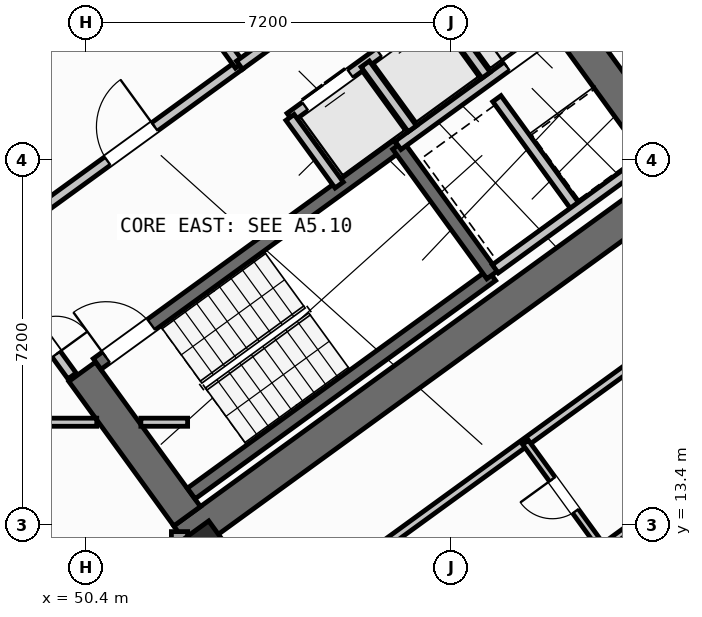
"""IFC4 building model, lengths in metres.
Left out: names, types, materials, properties, quantities, classifications, styles, units other than length and angle.
Written with IfcOpenShell. Run it as: python <this file> out.ifc"""

import sys

from ifc_helpers import new_model, si_unit, direction, frame, frame_2d, origin, origin_2d, place, context, subcontext, project, spatial, rectangle, hollow_rectangle, extrude, source, transform, mapped, element, fill, save


model = new_model("IFC4")
c1 = context("Model", 3, precision=1e-05, world=origin(), true_north=direction((0.0, 1.0)))
c2 = subcontext(c1, "Body", "Model", "MODEL_VIEW")
j1 = project(units=[si_unit("LENGTHUNIT", "METRE"), si_unit("PLANEANGLEUNIT", "RADIAN")], contexts=[c1])
p1 = place(None, origin())
s1 = spatial("IfcSite", under=j1, at=p1, CompositionType="ELEMENT")
p2 = place(p1, origin())
s2 = spatial("IfcBuilding", under=s1, at=p2, CompositionType="ELEMENT")
p3 = place(p2, frame((0.0, 0.0, 31.2)))
s3 = spatial("IfcBuildingStorey", under=s2, at=p3, CompositionType="ELEMENT", Elevation=31.2)
p4 = place(p3, frame((52.318, 13.11, 0.0), z_axis=(0.0, 0.0, 1.0), x_axis=(0.809019445368, 0.587781878776, 0.0)))
e1 = element("IfcWall", 1, at=p4, inside=s3, PredefinedType="SHEAR", context=c2, shape_type="SweptSolid", body=[
    extrude(rectangle(XDim=12.44, YDim=0.65, at=frame_2d((6.22, 0.0))), origin(), (0.0, 0.0, 1.0), 3.35),
])
p5 = place(p3, frame((52.39, 13.564, 0.0), z_axis=(0.0, 0.0, 1.0), x_axis=(-0.58779688989, 0.809008539037, 0.0)))
e2 = element("IfcWall", 2, at=p5, inside=s3, PredefinedType="SHEAR", context=c2, shape_type="SweptSolid", body=[
    extrude(rectangle(XDim=3.525, YDim=0.65, at=frame_2d((1.763, 0.0))), origin(), (0.0, 0.0, 1.0), 3.35),
])
p6 = place(p3, frame((61.929, 20.494, 0.0), z_axis=(0.0, 0.0, 1.0), x_axis=(-0.58782982593, 0.808984607855, 0.0)))
e3 = element("IfcWall", 3, at=p6, inside=s3, PredefinedType="SHEAR", context=c2, shape_type="SweptSolid", body=[
    extrude(rectangle(XDim=3.525, YDim=0.65, at=frame_2d((1.762, 0.0))), origin(), (0.0, 0.0, 1.0), 3.35),
])
m1 = source(origin(), c2, "Body", "SweptSolid", [
    extrude(hollow_rectangle(XDim=1.0, YDim=1.0, WallThickness=0.04, at=origin_2d()), origin(), (0.0, 0.0, 1.0), 3.6),
])
p7 = place(p3, frame((52.705, 12.773, 0.0), z_axis=(0.0, 0.0, 1.0), x_axis=(0.809016994375, 0.587785252292, 0.0)))
e4 = element("IfcColumn", 4, at=p7, inside=s3, PredefinedType="COLUMN", context=c2, shape_type="MappedRepresentation", body=[
    mapped(m1, transform((0.0, 0.0, 0.0), scale=1.0)),
])
p8 = place(p3, frame((58.455, 35.484, 0.0), z_axis=(0.0, 0.0, 1.0), x_axis=(0.587783625747, -0.809018176127, 0.0)))
e5 = element("IfcWall", 5, at=p8, inside=s3, PredefinedType="STANDARD", context=c2, shape_type="SweptSolid", body=[
    extrude(rectangle(XDim=21.587, YDim=0.32, at=frame_2d((10.794, 0.0))), origin(), (0.0, 0.0, 1.0), 2.725),
])
p9 = place(p8, frame((2.994, 0.0, 0.8)))
e6 = element("IfcOpeningElement", 6, at=p9, cuts=e5, PredefinedType="OPENING", context=c2, shape_type="SweptSolid", body=[
    extrude(rectangle(XDim=2.1, YDim=1.55, at=frame_2d((1.05, 0.775))), frame((0.0, 0.17, 0.0), z_axis=(0.0, -1.0, 0.0), x_axis=(1.0, 0.0, 0.0)), (0.0, 0.0, 1.0), 0.34),
])
p10 = place(p8, frame((11.934, 0.0, 0.85)))
e7 = element("IfcOpeningElement", 7, at=p10, cuts=e5, PredefinedType="OPENING", context=c2, shape_type="SweptSolid", body=[
    extrude(rectangle(XDim=1.8, YDim=1.5, at=frame_2d((0.9, 0.75))), frame((0.0, 0.17, 0.0), z_axis=(0.0, -1.0, 0.0), x_axis=(1.0, 0.0, 0.0)), (0.0, 0.0, 1.0), 0.34),
])
p11 = place(p8, frame((18.535, 0.0, 0.85)))
e8 = element("IfcOpeningElement", 8, at=p11, cuts=e5, PredefinedType="OPENING", context=c2, shape_type="SweptSolid", body=[
    extrude(rectangle(XDim=1.5, YDim=1.5, at=frame_2d((0.75, 0.75))), frame((0.0, 0.17, 0.0), z_axis=(0.0, -1.0, 0.0), x_axis=(1.0, 0.0, 0.0)), (0.0, 0.0, 1.0), 0.34),
])
p12 = place(p3, frame((71.098, 17.731, 0.0), z_axis=(0.0, 0.0, 1.0), x_axis=(-0.809021120468, -0.587779573171, 0.0)))
e9 = element("IfcWall", 9, at=p12, inside=s3, PredefinedType="STANDARD", context=c2, shape_type="SweptSolid", body=[
    extrude(rectangle(XDim=17.588, YDim=0.32, at=frame_2d((8.794, 0.0))), origin(), (0.0, 0.0, 1.0), 3.35),
])
p13 = place(p12, frame((1.624, 0.0, 0.0)))
e10 = element("IfcOpeningElement", 10, at=p13, cuts=e9, PredefinedType="OPENING", context=c2, shape_type="SweptSolid", body=[
    extrude(rectangle(XDim=1.05, YDim=2.15, at=frame_2d((0.525, 1.075))), frame((0.0, 0.17, 0.0), z_axis=(0.0, -1.0, 0.0), x_axis=(1.0, 0.0, 0.0)), (0.0, 0.0, 1.0), 0.34),
])
p14 = place(p12, frame((4.104, 0.0, 1.0)))
e11 = element("IfcOpeningElement", 11, at=p14, cuts=e9, PredefinedType="OPENING", context=c2, shape_type="SweptSolid", body=[
    extrude(rectangle(XDim=0.9, YDim=1.25, at=frame_2d((0.45, 0.625))), frame((0.0, 0.17, 0.0), z_axis=(0.0, -1.0, 0.0), x_axis=(1.0, 0.0, 0.0)), (0.0, 0.0, 1.0), 0.34),
])
p15 = place(p12, frame((7.879, 0.0, 0.85)))
e12 = element("IfcOpeningElement", 12, at=p15, cuts=e9, PredefinedType="OPENING", context=c2, shape_type="SweptSolid", body=[
    extrude(rectangle(XDim=1.8, YDim=1.5, at=frame_2d((0.9, 0.75))), frame((0.0, 0.17, 0.0), z_axis=(0.0, -1.0, 0.0), x_axis=(1.0, 0.0, 0.0)), (0.0, 0.0, 1.0), 0.34),
])
p16 = place(p12, frame((12.849, 0.0, 0.85)))
e13 = element("IfcOpeningElement", 13, at=p16, cuts=e9, PredefinedType="OPENING", context=c2, shape_type="SweptSolid", body=[
    extrude(rectangle(XDim=1.8, YDim=1.5, at=frame_2d((0.9, 0.75))), frame((0.0, 0.17, 0.0), z_axis=(0.0, -1.0, 0.0), x_axis=(1.0, 0.0, 0.0)), (0.0, 0.0, 1.0), 0.34),
])
p17 = place(p3, frame((52.24, 13.261, 0.0), z_axis=(0.0, 0.0, 1.0), x_axis=(0.0, -1.0, 0.0)))
e14 = element("IfcWall", 14, at=p17, inside=s3, PredefinedType="STANDARD", context=c2, shape_type="SweptSolid", body=[
    extrude(rectangle(XDim=9.795, YDim=0.32, at=frame_2d((4.897, 0.0))), origin(), (0.0, 0.0, 1.0), 3.35),
])
p18 = place(p17, frame((2.349, 0.0, 0.8)))
e15 = element("IfcOpeningElement", 15, at=p18, cuts=e14, PredefinedType="OPENING", context=c2, shape_type="SweptSolid", body=[
    extrude(rectangle(XDim=2.1, YDim=1.55, at=frame_2d((1.05, 0.775))), frame((0.0, 0.17, 0.0), z_axis=(0.0, -1.0, 0.0), x_axis=(1.0, 0.0, 0.0)), (0.0, 0.0, 1.0), 0.34),
])
p19 = place(p17, frame((7.03, 0.0, 0.85)))
e16 = element("IfcOpeningElement", 16, at=p19, cuts=e14, PredefinedType="OPENING", context=c2, shape_type="SweptSolid", body=[
    extrude(rectangle(XDim=1.8, YDim=1.5, at=frame_2d((0.9, 0.75))), frame((0.0, 0.17, 0.0), z_axis=(0.0, -1.0, 0.0), x_axis=(1.0, 0.0, 0.0)), (0.0, 0.0, 1.0), 0.34),
])
p20 = place(p3, frame((52.472, 14.013, 0.0), z_axis=(0.0, 0.0, 1.0), x_axis=(0.809028366311, 0.587769599847, 0.0)))
e17 = element("IfcWall", 17, at=p20, inside=s3, PredefinedType="SHEAR", context=c2, shape_type="SweptSolid", body=[
    extrude(rectangle(XDim=7.33, YDim=0.26, at=frame_2d((3.665, 0.0))), origin(), (0.0, 0.0, 1.0), 3.35),
])
p21 = place(p3, frame((50.615, 16.57, 0.0), z_axis=(0.0, 0.0, 1.0), x_axis=(0.809028366311, 0.587769599847, 0.0)))
e18 = element("IfcWall", 18, at=p21, inside=s3, PredefinedType="SHEAR", context=c2, shape_type="SweptSolid", body=[
    extrude(rectangle(XDim=7.33, YDim=0.26, at=frame_2d((3.665, 0.0))), origin(), (0.0, 0.0, 1.0), 3.35),
])
p22 = place(p21, frame((0.22, 0.0, 0.0)))
e19 = element("IfcOpeningElement", 19, at=p22, cuts=e18, PredefinedType="OPENING", context=c2, shape_type="SweptSolid", body=[
    extrude(rectangle(XDim=1.1, YDim=2.1, at=frame_2d((0.55, 1.05))), frame((0.0, 0.14, 0.0), z_axis=(0.0, -1.0, 0.0), x_axis=(1.0, 0.0, 0.0)), (0.0, 0.0, 1.0), 0.28),
])
p23 = place(p3, frame((58.41, 18.327, 0.0), z_axis=(0.0, 0.0, 1.0), x_axis=(-0.58776738483, 0.809029975545, 0.0)))
e20 = element("IfcWall", 20, at=p23, inside=s3, PredefinedType="SHEAR", context=c2, shape_type="SweptSolid", body=[
    extrude(rectangle(XDim=3.16, YDim=0.26, at=frame_2d((1.58, 0.0))), origin(), (0.0, 0.0, 1.0), 3.35),
])
p24 = place(p3, frame((47.106, 21.437, 0.0), z_axis=(0.0, 0.0, 1.0), x_axis=(0.809012514015, 0.58779141893, 0.0)))
e21 = element("IfcWall", 21, at=p24, inside=s3, PredefinedType="STANDARD", context=c2, shape_type="SweptSolid", body=[
    extrude(rectangle(XDim=3.398, YDim=0.2, at=frame_2d((1.699, 0.0))), origin(), (0.0, 0.0, 1.0), 3.34),
])
p25 = place(p24, frame((0.408, 0.0, 0.0)))
e22 = element("IfcOpeningElement", 22, at=p25, cuts=e21, PredefinedType="OPENING", context=c2, shape_type="SweptSolid", body=[
    extrude(rectangle(XDim=1.3, YDim=2.2, at=frame_2d((0.65, 1.1))), frame((0.0, 0.11, 0.0), z_axis=(0.0, -1.0, 0.0), x_axis=(1.0, 0.0, 0.0)), (0.0, 0.0, 1.0), 0.22),
])
p26 = place(p3, frame((48.799, 19.107, 0.0), z_axis=(0.0, 0.0, 1.0), x_axis=(0.809012959416, 0.587790805897, 0.0)))
e23 = element("IfcWall", 23, at=p26, inside=s3, PredefinedType="STANDARD", context=c2, shape_type="SweptSolid", body=[
    extrude(rectangle(XDim=5.718, YDim=0.2, at=frame_2d((2.859, 0.0))), origin(), (0.0, 0.0, 1.0), 3.34),
])
p27 = place(p26, frame((2.498, 0.0, 0.0)))
e24 = element("IfcOpeningElement", 24, at=p27, cuts=e23, PredefinedType="OPENING", context=c2, shape_type="SweptSolid", body=[
    extrude(rectangle(XDim=1.15, YDim=2.1, at=frame_2d((0.575, 1.05))), frame((0.0, 0.11, 0.0), z_axis=(0.0, -1.0, 0.0), x_axis=(1.0, 0.0, 0.0)), (0.0, 0.0, 1.0), 0.22),
])
p28 = place(p3, frame((56.553, 20.884, 0.0), z_axis=(0.0, 0.0, 1.0), x_axis=(0.809035789462, 0.587759382205, 0.0)))
e25 = element("IfcWall", 25, at=p28, inside=s3, PredefinedType="STANDARD", context=c2, shape_type="SweptSolid", body=[
    extrude(rectangle(XDim=3.768, YDim=0.2, at=frame_2d((1.884, 0.0))), origin(), (0.0, 0.0, 1.0), 3.34),
])
p29 = place(p28, frame((2.65, 0.0, 0.0)))
e26 = element("IfcOpeningElement", 26, at=p29, cuts=e25, PredefinedType="OPENING", context=c2, shape_type="SweptSolid", body=[
    extrude(rectangle(XDim=0.86, YDim=2.05, at=frame_2d((0.43, 1.025))), frame((0.0, 0.11, 0.0), z_axis=(0.0, -1.0, 0.0), x_axis=(1.0, 0.0, 0.0)), (0.0, 0.0, 1.0), 0.22),
])
p30 = place(p3, frame((54.421, 21.436, 0.0), z_axis=(0.0, 0.0, 1.0), x_axis=(0.809013710463, 0.587789772183, 0.0)))
e27 = element("IfcWall", 27, at=p30, inside=s3, PredefinedType="STANDARD", context=c2, shape_type="SweptSolid", body=[
    extrude(rectangle(XDim=5.36, YDim=0.2, at=frame_2d((2.68, 0.0))), origin(), (0.0, 0.0, 1.0), 3.34),
])
p31 = place(p30, frame((0.37, 0.0, 0.0)))
e28 = element("IfcOpeningElement", 28, at=p31, cuts=e27, PredefinedType="OPENING", context=c2, shape_type="SweptSolid", body=[
    extrude(rectangle(XDim=1.1, YDim=2.15, at=frame_2d((0.55, 1.075))), frame((0.0, 0.11, 0.0), z_axis=(0.0, -1.0, 0.0), x_axis=(1.0, 0.0, 0.0)), (0.0, 0.0, 1.0), 0.22),
])
p32 = place(p30, frame((2.17, 0.0, 0.0)))
e29 = element("IfcOpeningElement", 29, at=p32, cuts=e27, PredefinedType="OPENING", context=c2, shape_type="SweptSolid", body=[
    extrude(rectangle(XDim=1.1, YDim=2.15, at=frame_2d((0.55, 1.075))), frame((0.0, 0.11, 0.0), z_axis=(0.0, -1.0, 0.0), x_axis=(1.0, 0.0, 0.0)), (0.0, 0.0, 1.0), 0.22),
])
p33 = place(p30, frame((3.97, 0.0, 0.0)))
e30 = element("IfcOpeningElement", 30, at=p33, cuts=e27, PredefinedType="OPENING", context=c2, shape_type="SweptSolid", body=[
    extrude(rectangle(XDim=1.1, YDim=2.15, at=frame_2d((0.55, 1.075))), frame((0.0, 0.11, 0.0), z_axis=(0.0, -1.0, 0.0), x_axis=(1.0, 0.0, 0.0)), (0.0, 0.0, 1.0), 0.22),
])
p34 = place(p3, frame((55.391, 20.102, 0.0), z_axis=(0.0, 0.0, 1.0), x_axis=(-0.58778447739, 0.809017557374, 0.0)))
e31 = element("IfcWall", 31, at=p34, inside=s3, PredefinedType="STANDARD", context=c2, shape_type="SweptSolid", body=[
    extrude(rectangle(XDim=1.65, YDim=0.2, at=frame_2d((0.825, 0.0))), origin(), (0.0, 0.0, 1.0), 3.34),
])
p35 = place(p3, frame((56.834, 21.212, 0.0), z_axis=(0.0, 0.0, 1.0), x_axis=(-0.58776738483, 0.809029975545, 0.0)))
e32 = element("IfcWall", 32, at=p35, inside=s3, PredefinedType="STANDARD", context=c2, shape_type="SweptSolid", body=[
    extrude(rectangle(XDim=1.58, YDim=0.2, at=frame_2d((0.79, 0.0))), origin(), (0.0, 0.0, 1.0), 3.34),
])
p36 = place(p3, frame((58.29, 22.27, 0.0), z_axis=(0.0, 0.0, 1.0), x_axis=(-0.587840865826, 0.808976585857, 0.0)))
e33 = element("IfcWall", 33, at=p36, inside=s3, PredefinedType="STANDARD", context=c2, shape_type="SweptSolid", body=[
    extrude(rectangle(XDim=1.58, YDim=0.2, at=frame_2d((0.79, 0.0))), origin(), (0.0, 0.0, 1.0), 3.34),
])
p37 = place(p3, frame((60.067, 19.655, 0.0), z_axis=(0.0, 0.0, 1.0), x_axis=(-0.587800520745, 0.809005900975, 0.0)))
e34 = element("IfcWall", 34, at=p37, inside=s3, PredefinedType="STANDARD", context=c2, shape_type="SweptSolid", body=[
    extrude(rectangle(XDim=2.66, YDim=0.2, at=frame_2d((1.33, 0.0))), origin(), (0.0, 0.0, 1.0), 3.34),
])
p38 = place(p3, frame((58.472, 18.447, 0.0), z_axis=(0.0, 0.0, 1.0), x_axis=(0.809022487728, 0.587777691266, 0.0)))
e35 = element("IfcWall", 35, at=p38, inside=s3, PredefinedType="STANDARD", context=c2, shape_type="SweptSolid", body=[
    extrude(rectangle(XDim=3.648, YDim=0.2, at=frame_2d((1.824, 0.0))), origin(), (0.0, 0.0, 1.0), 3.34),
])
p39 = place(p3, frame((53.425, 22.468, 0.0), z_axis=(0.0, 0.0, 1.0), x_axis=(-0.5877230039, 0.809062216821, 0.0)))
e36 = element("IfcWall", 36, at=p39, inside=s3, PredefinedType="STANDARD", context=c2, shape_type="SweptSolid", body=[
    extrude(rectangle(XDim=2.88, YDim=0.2, at=frame_2d((1.44, 0.0))), origin(), (0.0, 0.0, 1.0), 3.34),
])
p40 = place(p3, frame((53.425, 22.468, 0.0), z_axis=(0.0, 0.0, 1.0), x_axis=(0.80902705128, 0.587771409902, 0.0)))
e37 = element("IfcWall", 37, at=p40, inside=s3, PredefinedType="STANDARD", context=c2, shape_type="SweptSolid", body=[
    extrude(rectangle(XDim=5.368, YDim=0.2, at=frame_2d((2.684, 0.0))), origin(), (0.0, 0.0, 1.0), 3.34),
])
p41 = place(p40, frame((4.28, 0.0, 0.0)))
e38 = element("IfcOpeningElement", 38, at=p41, cuts=e37, PredefinedType="OPENING", context=c2, shape_type="SweptSolid", body=[
    extrude(rectangle(XDim=0.86, YDim=2.05, at=frame_2d((0.43, 1.025))), frame((0.0, 0.11, 0.0), z_axis=(0.0, -1.0, 0.0), x_axis=(1.0, 0.0, 0.0)), (0.0, 0.0, 1.0), 0.22),
])
p42 = place(p40, frame((1.45, 0.0, 0.0)))
e39 = element("IfcOpeningElement", 39, at=p42, cuts=e37, PredefinedType="OPENING", context=c2, shape_type="SweptSolid", body=[
    extrude(rectangle(XDim=0.86, YDim=2.05, at=frame_2d((0.43, 1.025))), frame((0.0, 0.11, 0.0), z_axis=(0.0, -1.0, 0.0), x_axis=(1.0, 0.0, 0.0)), (0.0, 0.0, 1.0), 0.22),
])
p43 = place(p3, frame((35.296, 15.42, 0.0), z_axis=(0.0, 0.0, 1.0), x_axis=(1.0, 0.0, 0.0)))
e40 = element("IfcWall", 40, at=p43, inside=s3, PredefinedType="PARTITIONING", context=c2, shape_type="SweptSolid", body=[
    extrude(rectangle(XDim=15.311, YDim=0.16, at=frame_2d((7.655, 0.0))), origin(), (0.0, 0.0, 1.0), 3.34),
])
p44 = place(p43, frame((0.615, 0.0, 0.0)))
e41 = element("IfcOpeningElement", 41, at=p44, cuts=e40, PredefinedType="OPENING", context=c2, shape_type="SweptSolid", body=[
    extrude(rectangle(XDim=1.0, YDim=2.1, at=frame_2d((0.5, 1.05))), frame((0.0, 0.09, 0.0), z_axis=(0.0, -1.0, 0.0), x_axis=(1.0, 0.0, 0.0)), (0.0, 0.0, 1.0), 0.18),
])
p45 = place(p43, frame((9.035, 0.0, 0.0)))
e42 = element("IfcOpeningElement", 42, at=p45, cuts=e40, PredefinedType="OPENING", context=c2, shape_type="SweptSolid", body=[
    extrude(rectangle(XDim=1.0, YDim=2.1, at=frame_2d((0.5, 1.05))), frame((0.0, 0.09, 0.0), z_axis=(0.0, -1.0, 0.0), x_axis=(1.0, 0.0, 0.0)), (0.0, 0.0, 1.0), 0.18),
])
p46 = place(p3, frame((51.477, 15.42, 0.0), z_axis=(0.0, 0.0, 1.0), x_axis=(1.0, 0.0, 0.0)))
e43 = element("IfcWall", 43, at=p46, inside=s3, PredefinedType="PARTITIONING", context=c2, shape_type="SweptSolid", body=[
    extrude(rectangle(XDim=0.923, YDim=0.16, at=frame_2d((0.461, 0.0))), origin(), (0.0, 0.0, 1.0), 3.34),
])
p47 = place(p3, frame((50.119, 16.333, 0.0), z_axis=(0.0, 0.0, 1.0), x_axis=(-0.587749856981, 0.809042709391, 0.0)))
e44 = element("IfcWall", 44, at=p47, inside=s3, PredefinedType="STANDARD", context=c2, shape_type="SweptSolid", body=[
    extrude(rectangle(XDim=2.96, YDim=0.2, at=frame_2d((1.48, 0.0))), origin(), (0.0, 0.0, 1.0), 3.34),
])
p48 = place(p47, frame((0.53, 0.0, 0.0)))
e45 = element("IfcOpeningElement", 45, at=p48, cuts=e44, PredefinedType="OPENING", context=c2, shape_type="SweptSolid", body=[
    extrude(rectangle(XDim=1.5, YDim=2.15, at=frame_2d((0.75, 1.075))), frame((0.0, 0.11, 0.0), z_axis=(0.0, -1.0, 0.0), x_axis=(1.0, 0.0, 0.0)), (0.0, 0.0, 1.0), 0.22),
])
p49 = place(p3, frame((53.705, 11.126, 0.0), z_axis=(0.0, 0.0, 1.0), x_axis=(0.809014504436, 0.587788679384, 0.0)))
e46 = element("IfcWall", 46, at=p49, inside=s3, PredefinedType="PARTITIONING", context=c2, shape_type="SweptSolid", body=[
    extrude(rectangle(XDim=14.67, YDim=0.16, at=frame_2d((7.335, 0.0))), origin(), (0.0, 0.0, 1.0), 3.34),
])
p50 = place(p49, frame((10.2, 0.0, 0.0)))
e47 = element("IfcOpeningElement", 47, at=p50, cuts=e46, PredefinedType="OPENING", context=c2, shape_type="SweptSolid", body=[
    extrude(rectangle(XDim=1.0, YDim=2.1, at=frame_2d((0.5, 1.05))), frame((0.0, 0.09, 0.0), z_axis=(0.0, -1.0, 0.0), x_axis=(1.0, 0.0, 0.0)), (0.0, 0.0, 1.0), 0.18),
])
p51 = place(p3, frame((56.249, 9.785, 0.0), z_axis=(0.0, 0.0, 1.0), x_axis=(0.809011747655, 0.587792473715, 0.0)))
e48 = element("IfcWall", 48, at=p51, inside=s3, PredefinedType="PLUMBINGWALL", context=c2, shape_type="SweptSolid", body=[
    extrude(rectangle(XDim=13.4, YDim=0.14, at=frame_2d((6.7, 0.0))), origin(), (0.0, 0.0, 1.0), 3.34),
])
p52 = place(p51, frame((8.94, 0.0, 0.0)))
e49 = element("IfcOpeningElement", 49, at=p52, cuts=e48, PredefinedType="OPENING", context=c2, shape_type="SweptSolid", body=[
    extrude(rectangle(XDim=0.92, YDim=2.08, at=frame_2d((0.46, 1.04))), frame((0.0, 0.08, 0.0), z_axis=(0.0, -1.0, 0.0), x_axis=(1.0, 0.0, 0.0)), (0.0, 0.0, 1.0), 0.16),
])
p53 = place(p3, frame((60.585, 12.936, 0.0), z_axis=(0.0, 0.0, 1.0), x_axis=(-0.587772116736, 0.809026537752, 0.0)))
e50 = element("IfcWall", 50, at=p53, inside=s3, PredefinedType="PLUMBINGWALL", context=c2, shape_type="SweptSolid", body=[
    extrude(rectangle(XDim=2.58, YDim=0.14, at=frame_2d((1.29, 0.0))), origin(), (0.0, 0.0, 1.0), 3.34),
])
p54 = place(p53, frame((0.9, 0.0, 0.0)))
e51 = element("IfcOpeningElement", 51, at=p54, cuts=e50, PredefinedType="OPENING", context=c2, shape_type="SweptSolid", body=[
    extrude(rectangle(XDim=0.78, YDim=2.05, at=frame_2d((0.39, 1.025))), frame((0.0, 0.08, 0.0), z_axis=(0.0, -1.0, 0.0), x_axis=(1.0, 0.0, 0.0)), (0.0, 0.0, 1.0), 0.16),
])
m2 = source(origin(), c2, "Body", "SweptSolid", [
    extrude(rectangle(XDim=1.1, YDim=2.1, at=frame_2d((0.55, 1.05))), frame((0.0, 0.025, 0.0), z_axis=(0.0, -1.0, 0.0), x_axis=(1.0, 0.0, 0.0)), (0.0, 0.0, 1.0), 0.05),
])
p55 = place(p22, origin())
e52 = element("IfcDoor", 52, at=p55, inside=s3, OperationType="SINGLE_SWING_LEFT", PredefinedType="DOOR", context=c2, shape_type="MappedRepresentation", body=[
    mapped(m2, transform((0.0, 0.0, 0.0), scale=1.0)),
])
fill(e19, e52)
m3 = source(origin(), c2, "Body", "SweptSolid", [
    extrude(rectangle(XDim=1.15, YDim=2.1, at=frame_2d((0.575, 1.05))), frame((0.0, 0.025, 0.0), z_axis=(0.0, -1.0, 0.0), x_axis=(1.0, 0.0, 0.0)), (0.0, 0.0, 1.0), 0.05),
])
p56 = place(p27, origin())
e53 = element("IfcDoor", 53, at=p56, inside=s3, OperationType="SINGLE_SWING_RIGHT", PredefinedType="DOOR", context=c2, shape_type="MappedRepresentation", body=[
    mapped(m3, transform((0.0, 0.0, 0.0), scale=1.0)),
])
fill(e24, e53)
m4 = source(origin(), c2, "Body", "SweptSolid", [
    extrude(rectangle(XDim=1.1, YDim=2.15, at=frame_2d((0.55, 1.075))), frame((0.0, 0.025, 0.0), z_axis=(0.0, -1.0, 0.0), x_axis=(1.0, 0.0, 0.0)), (0.0, 0.0, 1.0), 0.05),
])
p57 = place(p31, origin())
e54 = element("IfcDoor", 54, at=p57, inside=s3, OperationType="DOUBLE_DOOR_SLIDING", PredefinedType="DOOR", context=c2, shape_type="MappedRepresentation", body=[
    mapped(m4, transform((0.0, 0.0, 0.0), scale=1.0)),
])
fill(e28, e54)
p58 = place(p32, origin())
e55 = element("IfcDoor", 55, at=p58, inside=s3, OperationType="DOUBLE_DOOR_SLIDING", PredefinedType="DOOR", context=c2, shape_type="MappedRepresentation", body=[
    mapped(m4, transform((0.0, 0.0, 0.0), scale=1.0)),
])
fill(e29, e55)
m5 = source(origin(), c2, "Body", "SweptSolid", [
    extrude(rectangle(XDim=0.86, YDim=2.05, at=frame_2d((0.43, 1.025))), frame((0.0, 0.025, 0.0), z_axis=(0.0, -1.0, 0.0), x_axis=(1.0, 0.0, 0.0)), (0.0, 0.0, 1.0), 0.05),
])
p59 = place(p29, origin())
e56 = element("IfcDoor", 56, at=p59, inside=s3, OperationType="SINGLE_SWING_LEFT", PredefinedType="DOOR", context=c2, shape_type="MappedRepresentation", body=[
    mapped(m5, transform((0.0, 0.0, 0.0), scale=1.0)),
])
fill(e26, e56)
m6 = source(origin(), c2, "Body", "SweptSolid", [
    extrude(rectangle(XDim=1.5, YDim=2.15, at=frame_2d((0.75, 1.075))), frame((0.0, 0.025, 0.0), z_axis=(0.0, -1.0, 0.0), x_axis=(1.0, 0.0, 0.0)), (0.0, 0.0, 1.0), 0.05),
])
p60 = place(p48, frame((1.5, 0.0, 0.0), z_axis=(0.0, 0.0, 1.0), x_axis=(-1.0, 0.0, 0.0)))
e57 = element("IfcDoor", 57, at=p60, inside=s3, OperationType="DOUBLE_DOOR_SINGLE_SWING", PredefinedType="DOOR", context=c2, shape_type="MappedRepresentation", body=[
    mapped(m6, transform((0.0, 0.0, 0.0), scale=1.0)),
])
fill(e45, e57)
m7 = source(origin(), c2, "Body", "SweptSolid", [
    extrude(rectangle(XDim=0.78, YDim=2.05, at=frame_2d((0.39, 1.025))), frame((0.0, 0.025, 0.0), z_axis=(0.0, -1.0, 0.0), x_axis=(1.0, 0.0, 0.0)), (0.0, 0.0, 1.0), 0.05),
])
p61 = place(p54, origin())
e58 = element("IfcDoor", 58, at=p61, inside=s3, OperationType="SINGLE_SWING_RIGHT", PredefinedType="DOOR", context=c2, shape_type="MappedRepresentation", body=[
    mapped(m7, transform((0.0, 0.0, 0.0), scale=1.0)),
])
fill(e51, e58)
save(model, sys.argv[1])
